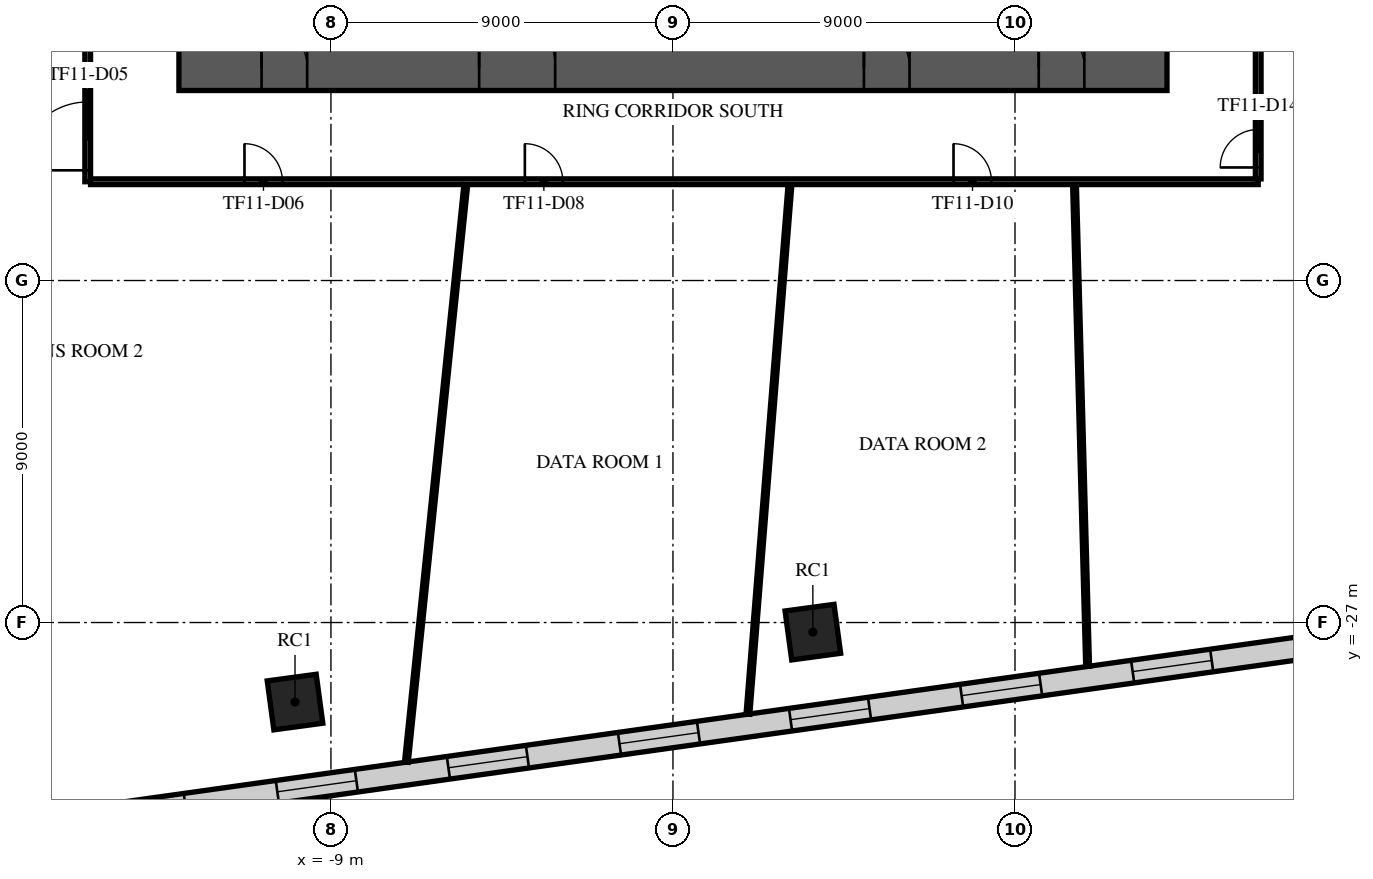
"""IFC4 building model, lengths in metres.
Left out: names, types, materials, properties, quantities, classifications, styles, units other than length and angle.
Written with IfcOpenShell. Run it as: python <this file> out.ifc"""

import sys

from ifc_helpers import new_model, si_unit, direction, frame, frame_2d, origin, origin_2d, place, context, subcontext, project, spatial, rectangle, extrude, element, fill, save


model = new_model("IFC4")
c1 = context("Model", 3, precision=1e-05, world=origin(), true_north=direction((0.0, 1.0)))
c2 = subcontext(c1, "Body", "Model", "MODEL_VIEW")
j1 = project(units=[si_unit("LENGTHUNIT", "METRE"), si_unit("PLANEANGLEUNIT", "RADIAN")], contexts=[c1])
p1 = place(None, origin())
s1 = spatial("IfcSite", under=j1, at=p1, CompositionType="ELEMENT")
p2 = place(p1, origin())
s2 = spatial("IfcBuilding", under=s1, at=p2, CompositionType="ELEMENT")
p3 = place(p2, frame((0.0, 0.0, 51.3)))
s3 = spatial("IfcBuildingStorey", under=s2, at=p3, CompositionType="ELEMENT", Elevation=51.3)
for number, where, z_axis, x_axis in (
    (1, (-9.945, -29.093, 0.0), (0.0, 0.0, 1.0), (0.991, 0.134, 0.0)),
    (2, (3.681, -27.253, 0.0), (0.0, 0.0, 1.0), (0.991, 0.134, 0.0)),
):
    element("IfcColumn", number, at=place(p3, frame(where, z_axis=z_axis, x_axis=x_axis)), inside=s3, PredefinedType="COLUMN", context=c2, shape_type="SweptSolid", body=[
        extrude(rectangle(XDim=1.3, YDim=1.3, at=origin_2d()), origin(), (0.0, 0.0, 1.0), 4.2),
    ])
p4 = place(p3, frame((-13.0, -12.4, 0.0), z_axis=(0.0, 0.0, 1.0), x_axis=(1.0, 0.0, 0.0)))
e3 = element("IfcWall", 3, at=p4, inside=s3, PredefinedType="SHEAR", context=c2, shape_type="SweptSolid", body=[
    extrude(rectangle(XDim=26.0, YDim=1.2, at=frame_2d((13.0, 0.0))), origin(), (0.0, 0.0, 1.0), 3.75),
])
p5 = place(p4, frame((7.9, 0.0, 0.0)))
e4 = element("IfcOpeningElement", 4, at=p5, cuts=e3, PredefinedType="OPENING", context=c2, shape_type="SweptSolid", body=[
    extrude(rectangle(XDim=2.0, YDim=2.1, at=frame_2d((1.0, 1.05))), frame((0.0, 0.61, 0.0), z_axis=(0.0, -1.0, 0.0), x_axis=(1.0, 0.0, 0.0)), (0.0, 0.0, 1.0), 1.22),
])
p6 = place(p4, frame((18.025, 0.0, 0.0)))
e5 = element("IfcOpeningElement", 5, at=p6, cuts=e3, PredefinedType="OPENING", context=c2, shape_type="SweptSolid", body=[
    extrude(rectangle(XDim=1.2, YDim=2.1, at=frame_2d((0.6, 1.05))), frame((0.0, 0.61, 0.0), z_axis=(0.0, -1.0, 0.0), x_axis=(1.0, 0.0, 0.0)), (0.0, 0.0, 1.0), 1.22),
])
p7 = place(p4, frame((2.175, 0.0, 0.0)))
e6 = element("IfcOpeningElement", 6, at=p7, cuts=e3, PredefinedType="OPENING", context=c2, shape_type="SweptSolid", body=[
    extrude(rectangle(XDim=1.2, YDim=2.1, at=frame_2d((0.6, 1.05))), frame((0.0, 0.61, 0.0), z_axis=(0.0, -1.0, 0.0), x_axis=(1.0, 0.0, 0.0)), (0.0, 0.0, 1.0), 1.22),
])
p8 = place(p4, frame((22.625, 0.0, 0.0)))
e7 = element("IfcOpeningElement", 7, at=p8, cuts=e3, PredefinedType="OPENING", context=c2, shape_type="SweptSolid", body=[
    extrude(rectangle(XDim=1.2, YDim=2.1, at=frame_2d((0.6, 1.05))), frame((0.0, 0.61, 0.0), z_axis=(0.0, -1.0, 0.0), x_axis=(1.0, 0.0, 0.0)), (0.0, 0.0, 1.0), 1.22),
])
p9 = place(p3, frame((-20.5, -32.873, 0.0), z_axis=(0.0, 0.0, 1.0), x_axis=(0.990268068675, 0.139173101431, 0.0)))
e8 = element("IfcWall", 8, at=p9, inside=s3, PredefinedType="STANDARD", context=c2, shape_type="SweptSolid", body=[
    extrude(rectangle(XDim=49.751, YDim=0.6, at=frame_2d((24.876, 0.0))), origin(), (0.0, 0.0, 1.0), 3.75),
])
p10 = place(p9, frame((1.161, 0.0, 0.9)))
e9 = element("IfcOpeningElement", 9, at=p10, cuts=e8, PredefinedType="OPENING", context=c2, shape_type="SweptSolid", body=[
    extrude(rectangle(XDim=2.1, YDim=2.1, at=frame_2d((1.05, 1.05))), frame((0.0, 0.31, 0.0), z_axis=(0.0, -1.0, 0.0), x_axis=(1.0, 0.0, 0.0)), (0.0, 0.0, 1.0), 0.62),
])
p11 = place(p9, frame((5.644, 0.0, 0.9)))
e10 = element("IfcOpeningElement", 10, at=p11, cuts=e8, PredefinedType="OPENING", context=c2, shape_type="SweptSolid", body=[
    extrude(rectangle(XDim=2.1, YDim=2.1, at=frame_2d((1.05, 1.05))), frame((0.0, 0.31, 0.0), z_axis=(0.0, -1.0, 0.0), x_axis=(1.0, 0.0, 0.0)), (0.0, 0.0, 1.0), 0.62),
])
p12 = place(p9, frame((10.189, 0.0, 0.9)))
e11 = element("IfcOpeningElement", 11, at=p12, cuts=e8, PredefinedType="OPENING", context=c2, shape_type="SweptSolid", body=[
    extrude(rectangle(XDim=2.1, YDim=2.1, at=frame_2d((1.05, 1.05))), frame((0.0, 0.31, 0.0), z_axis=(0.0, -1.0, 0.0), x_axis=(1.0, 0.0, 0.0)), (0.0, 0.0, 1.0), 0.62),
])
p13 = place(p9, frame((14.735, 0.0, 0.9)))
e12 = element("IfcOpeningElement", 12, at=p13, cuts=e8, PredefinedType="OPENING", context=c2, shape_type="SweptSolid", body=[
    extrude(rectangle(XDim=2.1, YDim=2.1, at=frame_2d((1.05, 1.05))), frame((0.0, 0.31, 0.0), z_axis=(0.0, -1.0, 0.0), x_axis=(1.0, 0.0, 0.0)), (0.0, 0.0, 1.0), 0.62),
])
p14 = place(p9, frame((19.28, 0.0, 0.9)))
e13 = element("IfcOpeningElement", 13, at=p14, cuts=e8, PredefinedType="OPENING", context=c2, shape_type="SweptSolid", body=[
    extrude(rectangle(XDim=2.1, YDim=2.1, at=frame_2d((1.05, 1.05))), frame((0.0, 0.31, 0.0), z_axis=(0.0, -1.0, 0.0), x_axis=(1.0, 0.0, 0.0)), (0.0, 0.0, 1.0), 0.62),
])
p15 = place(p9, frame((23.826, 0.0, 0.9)))
e14 = element("IfcOpeningElement", 14, at=p15, cuts=e8, PredefinedType="OPENING", context=c2, shape_type="SweptSolid", body=[
    extrude(rectangle(XDim=2.1, YDim=2.1, at=frame_2d((1.05, 1.05))), frame((0.0, 0.31, 0.0), z_axis=(0.0, -1.0, 0.0), x_axis=(1.0, 0.0, 0.0)), (0.0, 0.0, 1.0), 0.62),
])
p16 = place(p9, frame((28.371, 0.0, 0.9)))
e15 = element("IfcOpeningElement", 15, at=p16, cuts=e8, PredefinedType="OPENING", context=c2, shape_type="SweptSolid", body=[
    extrude(rectangle(XDim=2.1, YDim=2.1, at=frame_2d((1.05, 1.05))), frame((0.0, 0.31, 0.0), z_axis=(0.0, -1.0, 0.0), x_axis=(1.0, 0.0, 0.0)), (0.0, 0.0, 1.0), 0.62),
])
p17 = place(p9, frame((32.917, 0.0, 0.9)))
e16 = element("IfcOpeningElement", 16, at=p17, cuts=e8, PredefinedType="OPENING", context=c2, shape_type="SweptSolid", body=[
    extrude(rectangle(XDim=2.1, YDim=2.1, at=frame_2d((1.05, 1.05))), frame((0.0, 0.31, 0.0), z_axis=(0.0, -1.0, 0.0), x_axis=(1.0, 0.0, 0.0)), (0.0, 0.0, 1.0), 0.62),
])
p18 = place(p9, frame((37.462, 0.0, 0.9)))
e17 = element("IfcOpeningElement", 17, at=p18, cuts=e8, PredefinedType="OPENING", context=c2, shape_type="SweptSolid", body=[
    extrude(rectangle(XDim=2.1, YDim=2.1, at=frame_2d((1.05, 1.05))), frame((0.0, 0.31, 0.0), z_axis=(0.0, -1.0, 0.0), x_axis=(1.0, 0.0, 0.0)), (0.0, 0.0, 1.0), 0.62),
])
p19 = place(p9, frame((42.008, 0.0, 0.9)))
e18 = element("IfcOpeningElement", 18, at=p19, cuts=e8, PredefinedType="OPENING", context=c2, shape_type="SweptSolid", body=[
    extrude(rectangle(XDim=2.1, YDim=2.1, at=frame_2d((1.05, 1.05))), frame((0.0, 0.31, 0.0), z_axis=(0.0, -1.0, 0.0), x_axis=(1.0, 0.0, 0.0)), (0.0, 0.0, 1.0), 0.62),
])
p20 = place(p9, frame((46.491, 0.0, 0.9)))
e19 = element("IfcOpeningElement", 19, at=p20, cuts=e8, PredefinedType="OPENING", context=c2, shape_type="SweptSolid", body=[
    extrude(rectangle(XDim=2.1, YDim=2.1, at=frame_2d((1.05, 1.05))), frame((0.0, 0.31, 0.0), z_axis=(0.0, -1.0, 0.0), x_axis=(1.0, 0.0, 0.0)), (0.0, 0.0, 1.0), 0.62),
])
p21 = place(p3, frame((-15.4, -15.4, 0.0), z_axis=(0.0, 0.0, 1.0), x_axis=(0.0, 1.0, 0.0)))
e20 = element("IfcWall", 20, at=p21, inside=s3, PredefinedType="PARTITIONING", context=c2, shape_type="SweptSolid", body=[
    extrude(rectangle(XDim=30.8, YDim=0.15, at=frame_2d((15.4, 0.0))), origin(), (0.0, 0.0, 1.0), 3.25),
])
p22 = place(p21, frame((23.272, 0.0, 0.0)))
e21 = element("IfcOpeningElement", 21, at=p22, cuts=e20, PredefinedType="OPENING", context=c2, shape_type="SweptSolid", body=[
    extrude(rectangle(XDim=1.0, YDim=2.1, at=frame_2d((0.5, 1.05))), frame((0.0, 0.085, 0.0), z_axis=(0.0, -1.0, 0.0), x_axis=(1.0, 0.0, 0.0)), (0.0, 0.0, 1.0), 0.17),
])
p23 = place(p21, frame((9.982, 0.0, 0.0)))
e22 = element("IfcOpeningElement", 22, at=p23, cuts=e20, PredefinedType="OPENING", context=c2, shape_type="SweptSolid", body=[
    extrude(rectangle(XDim=1.0, YDim=2.1, at=frame_2d((0.5, 1.05))), frame((0.0, 0.085, 0.0), z_axis=(0.0, -1.0, 0.0), x_axis=(1.0, 0.0, 0.0)), (0.0, 0.0, 1.0), 0.17),
])
p24 = place(p21, frame((28.993, 0.0, 0.0)))
e23 = element("IfcOpeningElement", 23, at=p24, cuts=e20, PredefinedType="OPENING", context=c2, shape_type="SweptSolid", body=[
    extrude(rectangle(XDim=1.0, YDim=2.1, at=frame_2d((0.5, 1.05))), frame((0.0, 0.085, 0.0), z_axis=(0.0, -1.0, 0.0), x_axis=(1.0, 0.0, 0.0)), (0.0, 0.0, 1.0), 0.17),
])
p25 = place(p21, frame((0.3, 0.0, 0.0)))
e24 = element("IfcOpeningElement", 24, at=p25, cuts=e20, PredefinedType="OPENING", context=c2, shape_type="SweptSolid", body=[
    extrude(rectangle(XDim=1.8, YDim=2.1, at=frame_2d((0.9, 1.05))), frame((0.0, 0.085, 0.0), z_axis=(0.0, -1.0, 0.0), x_axis=(1.0, 0.0, 0.0)), (0.0, 0.0, 1.0), 0.17),
])
p26 = place(p3, frame((-15.325, -15.4, 0.0), z_axis=(0.0, 0.0, 1.0), x_axis=(1.0, 0.0, 0.0)))
e25 = element("IfcWall", 25, at=p26, inside=s3, PredefinedType="PARTITIONING", context=c2, shape_type="SweptSolid", body=[
    extrude(rectangle(XDim=30.725, YDim=0.15, at=frame_2d((15.362, 0.0))), origin(), (0.0, 0.0, 1.0), 3.25),
])
p27 = place(p26, frame((4.05, 0.0, 0.0)))
e26 = element("IfcOpeningElement", 26, at=p27, cuts=e25, PredefinedType="OPENING", context=c2, shape_type="SweptSolid", body=[
    extrude(rectangle(XDim=1.0, YDim=2.1, at=frame_2d((0.5, 1.05))), frame((0.0, 0.085, 0.0), z_axis=(0.0, -1.0, 0.0), x_axis=(1.0, 0.0, 0.0)), (0.0, 0.0, 1.0), 0.17),
])
p28 = place(p26, frame((11.428, 0.0, 0.0)))
e27 = element("IfcOpeningElement", 27, at=p28, cuts=e25, PredefinedType="OPENING", context=c2, shape_type="SweptSolid", body=[
    extrude(rectangle(XDim=1.0, YDim=2.1, at=frame_2d((0.5, 1.05))), frame((0.0, 0.085, 0.0), z_axis=(0.0, -1.0, 0.0), x_axis=(1.0, 0.0, 0.0)), (0.0, 0.0, 1.0), 0.17),
])
p29 = place(p26, frame((22.707, 0.0, 0.0)))
e28 = element("IfcOpeningElement", 28, at=p29, cuts=e25, PredefinedType="OPENING", context=c2, shape_type="SweptSolid", body=[
    extrude(rectangle(XDim=1.0, YDim=2.1, at=frame_2d((0.5, 1.05))), frame((0.0, 0.085, 0.0), z_axis=(0.0, -1.0, 0.0), x_axis=(1.0, 0.0, 0.0)), (0.0, 0.0, 1.0), 0.17),
])
p30 = place(p3, frame((15.4, -15.325, 0.0), z_axis=(0.0, 0.0, 1.0), x_axis=(0.0, 1.0, 0.0)))
e29 = element("IfcWall", 29, at=p30, inside=s3, PredefinedType="PARTITIONING", context=c2, shape_type="SweptSolid", body=[
    extrude(rectangle(XDim=30.65, YDim=0.15, at=frame_2d((15.325, 0.0))), origin(), (0.0, 0.0, 1.0), 3.25),
])
p31 = place(p30, frame((26.368, 0.0, 0.0)))
e30 = element("IfcOpeningElement", 30, at=p31, cuts=e29, PredefinedType="OPENING", context=c2, shape_type="SweptSolid", body=[
    extrude(rectangle(XDim=1.0, YDim=2.1, at=frame_2d((0.5, 1.05))), frame((0.0, 0.085, 0.0), z_axis=(0.0, -1.0, 0.0), x_axis=(1.0, 0.0, 0.0)), (0.0, 0.0, 1.0), 0.17),
])
p32 = place(p30, frame((6.3, 0.0, 0.0)))
e31 = element("IfcOpeningElement", 31, at=p32, cuts=e29, PredefinedType="OPENING", context=c2, shape_type="SweptSolid", body=[
    extrude(rectangle(XDim=1.8, YDim=2.1, at=frame_2d((0.9, 1.05))), frame((0.0, 0.085, 0.0), z_axis=(0.0, -1.0, 0.0), x_axis=(1.0, 0.0, 0.0)), (0.0, 0.0, 1.0), 0.17),
])
p33 = place(p30, frame((0.3, 0.0, 0.0)))
e32 = element("IfcOpeningElement", 32, at=p33, cuts=e29, PredefinedType="OPENING", context=c2, shape_type="SweptSolid", body=[
    extrude(rectangle(XDim=1.0, YDim=2.1, at=frame_2d((0.5, 1.05))), frame((0.0, 0.085, 0.0), z_axis=(0.0, -1.0, 0.0), x_axis=(1.0, 0.0, 0.0)), (0.0, 0.0, 1.0), 0.17),
])
p34 = place(p30, frame((13.806, 0.0, 0.0)))
e33 = element("IfcOpeningElement", 33, at=p34, cuts=e29, PredefinedType="OPENING", context=c2, shape_type="SweptSolid", body=[
    extrude(rectangle(XDim=1.8, YDim=2.1, at=frame_2d((0.9, 1.05))), frame((0.0, 0.085, 0.0), z_axis=(0.0, -1.0, 0.0), x_axis=(1.0, 0.0, 0.0)), (0.0, 0.0, 1.0), 0.17),
])
p35 = place(p30, frame((18.556, 0.0, 0.0)))
e34 = element("IfcOpeningElement", 34, at=p35, cuts=e29, PredefinedType="OPENING", context=c2, shape_type="SweptSolid", body=[
    extrude(rectangle(XDim=1.0, YDim=2.1, at=frame_2d((0.5, 1.05))), frame((0.0, 0.085, 0.0), z_axis=(0.0, -1.0, 0.0), x_axis=(1.0, 0.0, 0.0)), (0.0, 0.0, 1.0), 0.17),
])
p36 = place(p3, frame((-7.014, -30.673, 0.0), z_axis=(0.0, 0.0, 1.0), x_axis=(0.102353755437, 0.994748062953, 0.0)))
e35 = element("IfcWall", 35, at=p36, inside=s3, PredefinedType="PARTITIONING", context=c2, shape_type="SweptSolid", body=[
    extrude(rectangle(XDim=15.273, YDim=0.1, at=frame_2d((7.636, 0.0))), origin(), (0.0, 0.0, 1.0), 2.95),
])
p37 = place(p3, frame((1.973, -29.41, 0.0), z_axis=(0.0, 0.0, 1.0), x_axis=(0.079123741472, 0.996864802035, 0.0)))
e36 = element("IfcWall", 36, at=p37, inside=s3, PredefinedType="PARTITIONING", context=c2, shape_type="SweptSolid", body=[
    extrude(rectangle(XDim=13.974, YDim=0.1, at=frame_2d((6.987, 0.0))), origin(), (0.0, 0.0, 1.0), 2.95),
])
p38 = place(p3, frame((10.566, -15.476, 0.0), z_axis=(0.0, 0.0, 1.0), x_axis=(0.027144021526, -0.999631533164, 0.0)))
e37 = element("IfcWall", 37, at=p38, inside=s3, PredefinedType="PARTITIONING", context=c2, shape_type="SweptSolid", body=[
    extrude(rectangle(XDim=12.682, YDim=0.1, at=frame_2d((6.341, 0.0))), origin(), (0.0, 0.0, 1.0), 2.95),
])
p39 = place(p5, origin())
e38 = element("IfcDoor", 38, at=p39, inside=s3, OperationType="SINGLE_SWING_LEFT", PredefinedType="DOOR", context=c2, shape_type="SweptSolid", body=[
    extrude(rectangle(XDim=2.0, YDim=2.1, at=frame_2d((1.0, 1.05))), frame((0.0, 0.025, 0.0), z_axis=(0.0, -1.0, 0.0), x_axis=(1.0, 0.0, 0.0)), (0.0, 0.0, 1.0), 0.05),
])
fill(e4, e38)
p40 = place(p6, origin())
e39 = element("IfcDoor", 39, at=p40, inside=s3, OperationType="SINGLE_SWING_LEFT", PredefinedType="DOOR", context=c2, shape_type="SweptSolid", body=[
    extrude(rectangle(XDim=1.2, YDim=2.1, at=frame_2d((0.6, 1.05))), frame((0.0, 0.025, 0.0), z_axis=(0.0, -1.0, 0.0), x_axis=(1.0, 0.0, 0.0)), (0.0, 0.0, 1.0), 0.05),
])
fill(e5, e39)
p41 = place(p7, origin())
e40 = element("IfcDoor", 40, at=p41, inside=s3, OperationType="SINGLE_SWING_LEFT", PredefinedType="DOOR", context=c2, shape_type="SweptSolid", body=[
    extrude(rectangle(XDim=1.2, YDim=2.1, at=frame_2d((0.6, 1.05))), frame((0.0, 0.025, 0.0), z_axis=(0.0, -1.0, 0.0), x_axis=(1.0, 0.0, 0.0)), (0.0, 0.0, 1.0), 0.05),
])
fill(e6, e40)
p42 = place(p8, origin())
e41 = element("IfcDoor", 41, at=p42, inside=s3, OperationType="SINGLE_SWING_LEFT", PredefinedType="DOOR", context=c2, shape_type="SweptSolid", body=[
    extrude(rectangle(XDim=1.2, YDim=2.1, at=frame_2d((0.6, 1.05))), frame((0.0, 0.025, 0.0), z_axis=(0.0, -1.0, 0.0), x_axis=(1.0, 0.0, 0.0)), (0.0, 0.0, 1.0), 0.05),
])
fill(e7, e41)
p43 = place(p12, origin())
e42 = element("IfcWindow", 42, at=p43, inside=s3, PartitioningType="SINGLE_PANEL", PredefinedType="WINDOW", context=c2, shape_type="SweptSolid", body=[
    extrude(rectangle(XDim=2.1, YDim=2.1, at=frame_2d((1.05, 1.05))), frame((0.0, 0.03, 0.0), z_axis=(0.0, -1.0, 0.0), x_axis=(1.0, 0.0, 0.0)), (0.0, 0.0, 1.0), 0.06),
])
fill(e11, e42)
p44 = place(p13, origin())
e43 = element("IfcWindow", 43, at=p44, inside=s3, PartitioningType="SINGLE_PANEL", PredefinedType="WINDOW", context=c2, shape_type="SweptSolid", body=[
    extrude(rectangle(XDim=2.1, YDim=2.1, at=frame_2d((1.05, 1.05))), frame((0.0, 0.03, 0.0), z_axis=(0.0, -1.0, 0.0), x_axis=(1.0, 0.0, 0.0)), (0.0, 0.0, 1.0), 0.06),
])
fill(e12, e43)
p45 = place(p14, origin())
e44 = element("IfcWindow", 44, at=p45, inside=s3, PartitioningType="SINGLE_PANEL", PredefinedType="WINDOW", context=c2, shape_type="SweptSolid", body=[
    extrude(rectangle(XDim=2.1, YDim=2.1, at=frame_2d((1.05, 1.05))), frame((0.0, 0.03, 0.0), z_axis=(0.0, -1.0, 0.0), x_axis=(1.0, 0.0, 0.0)), (0.0, 0.0, 1.0), 0.06),
])
fill(e13, e44)
p46 = place(p15, origin())
e45 = element("IfcWindow", 45, at=p46, inside=s3, PartitioningType="SINGLE_PANEL", PredefinedType="WINDOW", context=c2, shape_type="SweptSolid", body=[
    extrude(rectangle(XDim=2.1, YDim=2.1, at=frame_2d((1.05, 1.05))), frame((0.0, 0.03, 0.0), z_axis=(0.0, -1.0, 0.0), x_axis=(1.0, 0.0, 0.0)), (0.0, 0.0, 1.0), 0.06),
])
fill(e14, e45)
p47 = place(p16, origin())
e46 = element("IfcWindow", 46, at=p47, inside=s3, PartitioningType="SINGLE_PANEL", PredefinedType="WINDOW", context=c2, shape_type="SweptSolid", body=[
    extrude(rectangle(XDim=2.1, YDim=2.1, at=frame_2d((1.05, 1.05))), frame((0.0, 0.03, 0.0), z_axis=(0.0, -1.0, 0.0), x_axis=(1.0, 0.0, 0.0)), (0.0, 0.0, 1.0), 0.06),
])
fill(e15, e46)
p48 = place(p17, origin())
e47 = element("IfcWindow", 47, at=p48, inside=s3, PartitioningType="SINGLE_PANEL", PredefinedType="WINDOW", context=c2, shape_type="SweptSolid", body=[
    extrude(rectangle(XDim=2.1, YDim=2.1, at=frame_2d((1.05, 1.05))), frame((0.0, 0.03, 0.0), z_axis=(0.0, -1.0, 0.0), x_axis=(1.0, 0.0, 0.0)), (0.0, 0.0, 1.0), 0.06),
])
fill(e16, e47)
p49 = place(p25, origin())
e48 = element("IfcDoor", 48, at=p49, inside=s3, OperationType="DOUBLE_DOOR_SINGLE_SWING", PredefinedType="DOOR", context=c2, shape_type="SweptSolid", body=[
    extrude(rectangle(XDim=1.8, YDim=2.1, at=frame_2d((0.9, 1.05))), frame((0.0, 0.025, 0.0), z_axis=(0.0, -1.0, 0.0), x_axis=(1.0, 0.0, 0.0)), (0.0, 0.0, 1.0), 0.05),
])
fill(e24, e48)
p50 = place(p27, frame((1.0, 0.0, 0.0), z_axis=(0.0, 0.0, 1.0), x_axis=(-1.0, 0.0, 0.0)))
e49 = element("IfcDoor", 49, at=p50, inside=s3, OperationType="SINGLE_SWING_LEFT", PredefinedType="DOOR", context=c2, shape_type="SweptSolid", body=[
    extrude(rectangle(XDim=1.0, YDim=2.1, at=frame_2d((0.5, 1.05))), frame((0.0, 0.025, 0.0), z_axis=(0.0, -1.0, 0.0), x_axis=(1.0, 0.0, 0.0)), (0.0, 0.0, 1.0), 0.05),
])
fill(e26, e49)
p51 = place(p28, frame((1.0, 0.0, 0.0), z_axis=(0.0, 0.0, 1.0), x_axis=(-1.0, 0.0, 0.0)))
e50 = element("IfcDoor", 50, at=p51, inside=s3, OperationType="SINGLE_SWING_RIGHT", PredefinedType="DOOR", context=c2, shape_type="SweptSolid", body=[
    extrude(rectangle(XDim=1.0, YDim=2.1, at=frame_2d((0.5, 1.05))), frame((0.0, 0.025, 0.0), z_axis=(0.0, -1.0, 0.0), x_axis=(1.0, 0.0, 0.0)), (0.0, 0.0, 1.0), 0.05),
])
fill(e27, e50)
p52 = place(p29, frame((1.0, 0.0, 0.0), z_axis=(0.0, 0.0, 1.0), x_axis=(-1.0, 0.0, 0.0)))
e51 = element("IfcDoor", 51, at=p52, inside=s3, OperationType="SINGLE_SWING_LEFT", PredefinedType="DOOR", context=c2, shape_type="SweptSolid", body=[
    extrude(rectangle(XDim=1.0, YDim=2.1, at=frame_2d((0.5, 1.05))), frame((0.0, 0.025, 0.0), z_axis=(0.0, -1.0, 0.0), x_axis=(1.0, 0.0, 0.0)), (0.0, 0.0, 1.0), 0.05),
])
fill(e28, e51)
p53 = place(p33, frame((1.0, 0.0, 0.0), z_axis=(0.0, 0.0, 1.0), x_axis=(-1.0, 0.0, 0.0)))
e52 = element("IfcDoor", 52, at=p53, inside=s3, OperationType="SINGLE_SWING_RIGHT", PredefinedType="DOOR", context=c2, shape_type="SweptSolid", body=[
    extrude(rectangle(XDim=1.0, YDim=2.1, at=frame_2d((0.5, 1.05))), frame((0.0, 0.025, 0.0), z_axis=(0.0, -1.0, 0.0), x_axis=(1.0, 0.0, 0.0)), (0.0, 0.0, 1.0), 0.05),
])
fill(e32, e52)
save(model, sys.argv[1])
